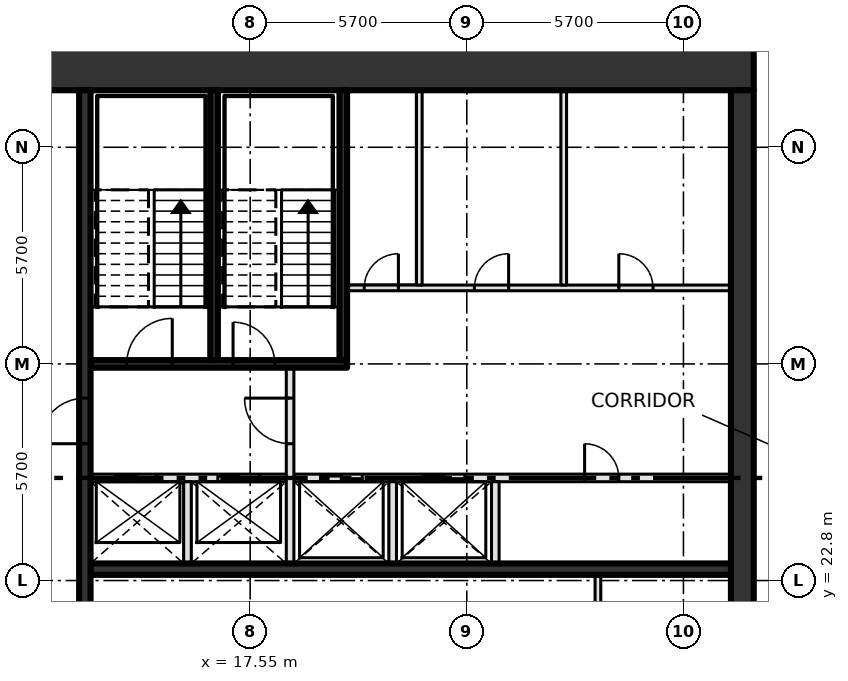
"""IFC4 building model, lengths in metres.
Left out: names, types, materials, properties, quantities, classifications, styles, units other than length and angle.
Written with IfcOpenShell. Run it as: python <this file> out.ifc"""

import sys

from ifc_helpers import new_model, si_unit, direction, frame, frame_2d, origin, place, context, subcontext, project, spatial, rectangle, extrude, element, fill, save


model = new_model("IFC4")
c1 = context("Model", 3, precision=1e-05, world=origin(), true_north=direction((0.0, 1.0)))
c2 = subcontext(c1, "Body", "Model", "MODEL_VIEW")
j1 = project(units=[si_unit("LENGTHUNIT", "METRE"), si_unit("PLANEANGLEUNIT", "RADIAN")], contexts=[c1])
p1 = place(None, origin())
s1 = spatial("IfcSite", under=j1, at=p1, CompositionType="ELEMENT")
p2 = place(p1, origin())
s2 = spatial("IfcBuilding", under=s1, at=p2, CompositionType="ELEMENT")
p3 = place(p2, frame((0.0, 0.0, 327.6)))
s3 = spatial("IfcBuildingStorey", under=s2, at=p3, CompositionType="ELEMENT", Elevation=327.6)
p4 = place(p3, frame((8.0, 36.3, -0.3), z_axis=(0.0, 0.0, 1.0), x_axis=(1.0, 0.0, 0.0)))
e1 = element("IfcWall", 1, at=p4, inside=s3, PredefinedType="SHEAR", context=c2, shape_type="SweptSolid", body=[
    extrude(rectangle(XDim=22.8, YDim=1.2, at=frame_2d((11.4, 0.0))), origin(), (0.0, 0.0, 1.0), 4.2),
])
p5 = place(p4, frame((2.3, 0.0, 0.3)))
e2 = element("IfcOpeningElement", 2, at=p5, cuts=e1, PredefinedType="OPENING", context=c2, shape_type="SweptSolid", body=[
    extrude(rectangle(XDim=1.8, YDim=2.1, at=frame_2d((0.9, 1.05))), frame((0.0, 0.61, 0.0), z_axis=(0.0, -1.0, 0.0), x_axis=(1.0, 0.0, 0.0)), (0.0, 0.0, 1.0), 1.22),
])
p6 = place(p3, frame((30.5, 14.7, -0.3), z_axis=(0.0, 0.0, 1.0), x_axis=(0.0, 1.0, 0.0)))
e3 = element("IfcWall", 3, at=p6, inside=s3, PredefinedType="SHEAR", context=c2, shape_type="SweptSolid", body=[
    extrude(rectangle(XDim=21.0, YDim=0.6, at=frame_2d((10.5, 0.0))), origin(), (0.0, 0.0, 1.0), 4.2),
])
p7 = place(p3, frame((13.35, 23.1, 0.0), z_axis=(0.0, 0.0, 1.0), x_axis=(1.0, 0.0, 0.0)))
e4 = element("IfcWall", 4, at=p7, inside=s3, PredefinedType="SHEAR", context=c2, shape_type="SweptSolid", body=[
    extrude(rectangle(XDim=16.85, YDim=0.3, at=frame_2d((8.425, 0.0))), origin(), (0.0, 0.0, 1.0), 3.9),
])
p8 = place(p3, frame((13.35, 25.5, 0.0), z_axis=(0.0, 0.0, 1.0), x_axis=(1.0, 0.0, 0.0)))
e5 = element("IfcWall", 5, at=p8, inside=s3, PredefinedType="SOLIDWALL", context=c2, shape_type="SweptSolid", body=[
    extrude(rectangle(XDim=16.85, YDim=0.2, at=frame_2d((8.425, 0.0))), origin(), (0.0, 0.0, 1.0), 3.9),
])
p9 = place(p8, frame((0.65, 0.0, 0.0)))
e6 = element("IfcOpeningElement", 6, at=p9, cuts=e5, PredefinedType="OPENING", context=c2, shape_type="SweptSolid", body=[
    extrude(rectangle(XDim=1.1, YDim=2.1, at=frame_2d((0.55, 1.05))), frame((0.0, 0.11, 0.0), z_axis=(0.0, -1.0, 0.0), x_axis=(1.0, 0.0, 0.0)), (0.0, 0.0, 1.0), 0.22),
])
p10 = place(p8, frame((3.35, 0.0, 0.0)))
e7 = element("IfcOpeningElement", 7, at=p10, cuts=e5, PredefinedType="OPENING", context=c2, shape_type="SweptSolid", body=[
    extrude(rectangle(XDim=1.1, YDim=2.1, at=frame_2d((0.55, 1.05))), frame((0.0, 0.11, 0.0), z_axis=(0.0, -1.0, 0.0), x_axis=(1.0, 0.0, 0.0)), (0.0, 0.0, 1.0), 0.22),
])
p11 = place(p8, frame((6.05, 0.0, 0.0)))
e8 = element("IfcOpeningElement", 8, at=p11, cuts=e5, PredefinedType="OPENING", context=c2, shape_type="SweptSolid", body=[
    extrude(rectangle(XDim=1.1, YDim=2.1, at=frame_2d((0.55, 1.05))), frame((0.0, 0.11, 0.0), z_axis=(0.0, -1.0, 0.0), x_axis=(1.0, 0.0, 0.0)), (0.0, 0.0, 1.0), 0.22),
])
p12 = place(p8, frame((8.75, 0.0, 0.0)))
e9 = element("IfcOpeningElement", 9, at=p12, cuts=e5, PredefinedType="OPENING", context=c2, shape_type="SweptSolid", body=[
    extrude(rectangle(XDim=1.1, YDim=2.1, at=frame_2d((0.55, 1.05))), frame((0.0, 0.11, 0.0), z_axis=(0.0, -1.0, 0.0), x_axis=(1.0, 0.0, 0.0)), (0.0, 0.0, 1.0), 0.22),
])
p13 = place(p8, frame((13.0, 0.0, 0.0)))
e10 = element("IfcOpeningElement", 10, at=p13, cuts=e5, PredefinedType="OPENING", context=c2, shape_type="SweptSolid", body=[
    extrude(rectangle(XDim=0.9, YDim=2.1, at=frame_2d((0.45, 1.05))), frame((0.0, 0.11, 0.0), z_axis=(0.0, -1.0, 0.0), x_axis=(1.0, 0.0, 0.0)), (0.0, 0.0, 1.0), 0.22),
])
p14 = place(p3, frame((13.35, 28.5, 0.0), z_axis=(0.0, 0.0, 1.0), x_axis=(1.0, 0.0, 0.0)))
e11 = element("IfcWall", 11, at=p14, inside=s3, PredefinedType="SOLIDWALL", context=c2, shape_type="SweptSolid", body=[
    extrude(rectangle(XDim=6.75, YDim=0.2, at=frame_2d((3.375, 0.0))), origin(), (0.0, 0.0, 1.0), 3.9),
])
p15 = place(p14, frame((0.95, 0.0, 0.0)))
e12 = element("IfcOpeningElement", 12, at=p15, cuts=e11, PredefinedType="OPENING", context=c2, shape_type="SweptSolid", body=[
    extrude(rectangle(XDim=1.2, YDim=2.1, at=frame_2d((0.6, 1.05))), frame((0.0, 0.11, 0.0), z_axis=(0.0, -1.0, 0.0), x_axis=(1.0, 0.0, 0.0)), (0.0, 0.0, 1.0), 0.22),
])
p16 = place(p14, frame((3.75, 0.0, 0.0)))
e13 = element("IfcOpeningElement", 13, at=p16, cuts=e11, PredefinedType="OPENING", context=c2, shape_type="SweptSolid", body=[
    extrude(rectangle(XDim=1.1, YDim=2.1, at=frame_2d((0.55, 1.05))), frame((0.0, 0.11, 0.0), z_axis=(0.0, -1.0, 0.0), x_axis=(1.0, 0.0, 0.0)), (0.0, 0.0, 1.0), 0.22),
])
p17 = place(p3, frame((20.1, 30.5, 0.0), z_axis=(0.0, 0.0, 1.0), x_axis=(1.0, 0.0, 0.0)))
e14 = element("IfcWall", 14, at=p17, inside=s3, PredefinedType="PARTITIONING", context=c2, shape_type="SweptSolid", body=[
    extrude(rectangle(XDim=10.1, YDim=0.15, at=frame_2d((5.05, 0.0))), origin(), (0.0, 0.0, 1.0), 3.9),
])
p18 = place(p17, frame((0.45, 0.0, 0.0)))
e15 = element("IfcOpeningElement", 15, at=p18, cuts=e14, PredefinedType="OPENING", context=c2, shape_type="SweptSolid", body=[
    extrude(rectangle(XDim=0.9, YDim=2.1, at=frame_2d((0.45, 1.05))), frame((0.0, 0.085, 0.0), z_axis=(0.0, -1.0, 0.0), x_axis=(1.0, 0.0, 0.0)), (0.0, 0.0, 1.0), 0.17),
])
p19 = place(p17, frame((3.35, 0.0, 0.0)))
e16 = element("IfcOpeningElement", 16, at=p19, cuts=e14, PredefinedType="OPENING", context=c2, shape_type="SweptSolid", body=[
    extrude(rectangle(XDim=0.9, YDim=2.1, at=frame_2d((0.45, 1.05))), frame((0.0, 0.085, 0.0), z_axis=(0.0, -1.0, 0.0), x_axis=(1.0, 0.0, 0.0)), (0.0, 0.0, 1.0), 0.17),
])
p20 = place(p17, frame((7.15, 0.0, 0.0)))
e17 = element("IfcOpeningElement", 17, at=p20, cuts=e14, PredefinedType="OPENING", context=c2, shape_type="SweptSolid", body=[
    extrude(rectangle(XDim=0.9, YDim=2.1, at=frame_2d((0.45, 1.05))), frame((0.0, 0.085, 0.0), z_axis=(0.0, -1.0, 0.0), x_axis=(1.0, 0.0, 0.0)), (0.0, 0.0, 1.0), 0.17),
])
p21 = place(p3, frame((13.2, 14.7, 0.0), z_axis=(0.0, 0.0, 1.0), x_axis=(0.0, 1.0, 0.0)))
e18 = element("IfcWall", 18, at=p21, inside=s3, PredefinedType="SHEAR", context=c2, shape_type="SweptSolid", body=[
    extrude(rectangle(XDim=21.0, YDim=0.3, at=frame_2d((10.5, 0.0))), origin(), (0.0, 0.0, 1.0), 3.9),
])
p22 = place(p21, frame((3.6, 0.0, 0.0)))
e19 = element("IfcOpeningElement", 19, at=p22, cuts=e18, PredefinedType="OPENING", context=c2, shape_type="SweptSolid", body=[
    extrude(rectangle(XDim=1.8, YDim=2.1, at=frame_2d((0.9, 1.05))), frame((0.0, 0.16, 0.0), z_axis=(0.0, -1.0, 0.0), x_axis=(1.0, 0.0, 0.0)), (0.0, 0.0, 1.0), 0.32),
])
p23 = place(p21, frame((11.7, 0.0, 0.0)))
e20 = element("IfcOpeningElement", 20, at=p23, cuts=e18, PredefinedType="OPENING", context=c2, shape_type="SweptSolid", body=[
    extrude(rectangle(XDim=1.2, YDim=2.1, at=frame_2d((0.6, 1.05))), frame((0.0, 0.16, 0.0), z_axis=(0.0, -1.0, 0.0), x_axis=(1.0, 0.0, 0.0)), (0.0, 0.0, 1.0), 0.32),
])
p24 = place(p3, frame((15.9, 23.25, 0.0), z_axis=(0.0, 0.0, 1.0), x_axis=(0.0, 1.0, 0.0)))
e21 = element("IfcWall", 21, at=p24, inside=s3, PredefinedType="SOLIDWALL", context=c2, shape_type="SweptSolid", body=[
    extrude(rectangle(XDim=2.15, YDim=0.2, at=frame_2d((1.075, 0.0))), origin(), (0.0, 0.0, 1.0), 3.9),
])
p25 = place(p3, frame((16.6, 28.6, 0.0), z_axis=(0.0, 0.0, 1.0), x_axis=(0.0, 1.0, 0.0)))
e22 = element("IfcWall", 22, at=p25, inside=s3, PredefinedType="SOLIDWALL", context=c2, shape_type="SweptSolid", body=[
    extrude(rectangle(XDim=7.1, YDim=0.2, at=frame_2d((3.55, 0.0))), origin(), (0.0, 0.0, 1.0), 3.9),
])
p26 = place(p3, frame((18.6, 23.25, 0.0), z_axis=(0.0, 0.0, 1.0), x_axis=(0.0, 1.0, 0.0)))
e23 = element("IfcWall", 23, at=p26, inside=s3, PredefinedType="SOLIDWALL", context=c2, shape_type="SweptSolid", body=[
    extrude(rectangle(XDim=5.15, YDim=0.2, at=frame_2d((2.575, 0.0))), origin(), (0.0, 0.0, 1.0), 3.9),
])
p27 = place(p26, frame((3.15, 0.0, 0.0)))
e24 = element("IfcOpeningElement", 24, at=p27, cuts=e23, PredefinedType="OPENING", context=c2, shape_type="SweptSolid", body=[
    extrude(rectangle(XDim=1.2, YDim=2.1, at=frame_2d((0.6, 1.05))), frame((0.0, 0.11, 0.0), z_axis=(0.0, -1.0, 0.0), x_axis=(1.0, 0.0, 0.0)), (0.0, 0.0, 1.0), 0.22),
])
p28 = place(p3, frame((20.0, 28.6, 0.0), z_axis=(0.0, 0.0, 1.0), x_axis=(0.0, 1.0, 0.0)))
e25 = element("IfcWall", 25, at=p28, inside=s3, PredefinedType="SOLIDWALL", context=c2, shape_type="SweptSolid", body=[
    extrude(rectangle(XDim=7.1, YDim=0.2, at=frame_2d((3.55, 0.0))), origin(), (0.0, 0.0, 1.0), 3.9),
])
p29 = place(p3, frame((21.3, 23.25, 0.0), z_axis=(0.0, 0.0, 1.0), x_axis=(0.0, 1.0, 0.0)))
e26 = element("IfcWall", 26, at=p29, inside=s3, PredefinedType="SOLIDWALL", context=c2, shape_type="SweptSolid", body=[
    extrude(rectangle(XDim=2.15, YDim=0.2, at=frame_2d((1.075, 0.0))), origin(), (0.0, 0.0, 1.0), 3.9),
])
p30 = place(p3, frame((22.0, 30.575, 0.0), z_axis=(0.0, 0.0, 1.0), x_axis=(0.0, 1.0, 0.0)))
e27 = element("IfcWall", 27, at=p30, inside=s3, PredefinedType="PARTITIONING", context=c2, shape_type="SweptSolid", body=[
    extrude(rectangle(XDim=5.125, YDim=0.15, at=frame_2d((2.562, 0.0))), origin(), (0.0, 0.0, 1.0), 3.9),
])
p31 = place(p3, frame((24.0, 23.25, 0.0), z_axis=(0.0, 0.0, 1.0), x_axis=(0.0, 1.0, 0.0)))
e28 = element("IfcWall", 28, at=p31, inside=s3, PredefinedType="SOLIDWALL", context=c2, shape_type="SweptSolid", body=[
    extrude(rectangle(XDim=2.15, YDim=0.2, at=frame_2d((1.075, 0.0))), origin(), (0.0, 0.0, 1.0), 3.9),
])
p32 = place(p3, frame((25.8, 30.575, 0.0), z_axis=(0.0, 0.0, 1.0), x_axis=(0.0, 1.0, 0.0)))
e29 = element("IfcWall", 29, at=p32, inside=s3, PredefinedType="PARTITIONING", context=c2, shape_type="SweptSolid", body=[
    extrude(rectangle(XDim=5.125, YDim=0.15, at=frame_2d((2.562, 0.0))), origin(), (0.0, 0.0, 1.0), 3.9),
])
p33 = place(p3, frame((26.7, 20.775, 0.0), z_axis=(0.0, 0.0, 1.0), x_axis=(0.0, 1.0, 0.0)))
e30 = element("IfcWall", 30, at=p33, inside=s3, PredefinedType="PARTITIONING", context=c2, shape_type="SweptSolid", body=[
    extrude(rectangle(XDim=2.175, YDim=0.15, at=frame_2d((1.087, 0.0))), origin(), (0.0, 0.0, 1.0), 3.9),
])
p34 = place(p9, origin())
e31 = element("IfcDoor", 31, at=p34, inside=s3, OperationType="SLIDING_TO_LEFT", PredefinedType="DOOR", context=c2, shape_type="SweptSolid", body=[
    extrude(rectangle(XDim=1.1, YDim=2.1, at=frame_2d((0.55, 1.05))), frame((0.0, 0.025, 0.0), z_axis=(0.0, -1.0, 0.0), x_axis=(1.0, 0.0, 0.0)), (0.0, 0.0, 1.0), 0.05),
])
fill(e6, e31)
p35 = place(p10, origin())
e32 = element("IfcDoor", 32, at=p35, inside=s3, OperationType="SLIDING_TO_LEFT", PredefinedType="DOOR", context=c2, shape_type="SweptSolid", body=[
    extrude(rectangle(XDim=1.1, YDim=2.1, at=frame_2d((0.55, 1.05))), frame((0.0, 0.025, 0.0), z_axis=(0.0, -1.0, 0.0), x_axis=(1.0, 0.0, 0.0)), (0.0, 0.0, 1.0), 0.05),
])
fill(e7, e32)
p36 = place(p11, origin())
e33 = element("IfcDoor", 33, at=p36, inside=s3, OperationType="SLIDING_TO_LEFT", PredefinedType="DOOR", context=c2, shape_type="SweptSolid", body=[
    extrude(rectangle(XDim=1.1, YDim=2.1, at=frame_2d((0.55, 1.05))), frame((0.0, 0.025, 0.0), z_axis=(0.0, -1.0, 0.0), x_axis=(1.0, 0.0, 0.0)), (0.0, 0.0, 1.0), 0.05),
])
fill(e8, e33)
p37 = place(p12, origin())
e34 = element("IfcDoor", 34, at=p37, inside=s3, OperationType="SLIDING_TO_LEFT", PredefinedType="DOOR", context=c2, shape_type="SweptSolid", body=[
    extrude(rectangle(XDim=1.1, YDim=2.1, at=frame_2d((0.55, 1.05))), frame((0.0, 0.025, 0.0), z_axis=(0.0, -1.0, 0.0), x_axis=(1.0, 0.0, 0.0)), (0.0, 0.0, 1.0), 0.05),
])
fill(e9, e34)
p38 = place(p13, origin())
e35 = element("IfcDoor", 35, at=p38, inside=s3, OperationType="SINGLE_SWING_LEFT", PredefinedType="DOOR", context=c2, shape_type="SweptSolid", body=[
    extrude(rectangle(XDim=0.9, YDim=2.1, at=frame_2d((0.45, 1.05))), frame((0.0, 0.025, 0.0), z_axis=(0.0, -1.0, 0.0), x_axis=(1.0, 0.0, 0.0)), (0.0, 0.0, 1.0), 0.05),
])
fill(e10, e35)
p39 = place(p18, origin())
e36 = element("IfcDoor", 36, at=p39, inside=s3, OperationType="SINGLE_SWING_RIGHT", PredefinedType="DOOR", context=c2, shape_type="SweptSolid", body=[
    extrude(rectangle(XDim=0.9, YDim=2.1, at=frame_2d((0.45, 1.05))), frame((0.0, 0.025, 0.0), z_axis=(0.0, -1.0, 0.0), x_axis=(1.0, 0.0, 0.0)), (0.0, 0.0, 1.0), 0.05),
])
fill(e15, e36)
p40 = place(p19, origin())
e37 = element("IfcDoor", 37, at=p40, inside=s3, OperationType="SINGLE_SWING_RIGHT", PredefinedType="DOOR", context=c2, shape_type="SweptSolid", body=[
    extrude(rectangle(XDim=0.9, YDim=2.1, at=frame_2d((0.45, 1.05))), frame((0.0, 0.025, 0.0), z_axis=(0.0, -1.0, 0.0), x_axis=(1.0, 0.0, 0.0)), (0.0, 0.0, 1.0), 0.05),
])
fill(e16, e37)
p41 = place(p20, origin())
e38 = element("IfcDoor", 38, at=p41, inside=s3, OperationType="SINGLE_SWING_LEFT", PredefinedType="DOOR", context=c2, shape_type="SweptSolid", body=[
    extrude(rectangle(XDim=0.9, YDim=2.1, at=frame_2d((0.45, 1.05))), frame((0.0, 0.025, 0.0), z_axis=(0.0, -1.0, 0.0), x_axis=(1.0, 0.0, 0.0)), (0.0, 0.0, 1.0), 0.05),
])
fill(e17, e38)
p42 = place(p15, origin())
e39 = element("IfcDoor", 39, at=p42, inside=s3, OperationType="SINGLE_SWING_RIGHT", PredefinedType="DOOR", context=c2, shape_type="SweptSolid", body=[
    extrude(rectangle(XDim=1.2, YDim=2.1, at=frame_2d((0.6, 1.05))), frame((0.0, 0.025, 0.0), z_axis=(0.0, -1.0, 0.0), x_axis=(1.0, 0.0, 0.0)), (0.0, 0.0, 1.0), 0.05),
])
fill(e12, e39)
p43 = place(p16, origin())
e40 = element("IfcDoor", 40, at=p43, inside=s3, OperationType="SINGLE_SWING_LEFT", PredefinedType="DOOR", context=c2, shape_type="SweptSolid", body=[
    extrude(rectangle(XDim=1.1, YDim=2.1, at=frame_2d((0.55, 1.05))), frame((0.0, 0.025, 0.0), z_axis=(0.0, -1.0, 0.0), x_axis=(1.0, 0.0, 0.0)), (0.0, 0.0, 1.0), 0.05),
])
fill(e13, e40)
p44 = place(p23, origin())
e41 = element("IfcDoor", 41, at=p44, inside=s3, OperationType="SINGLE_SWING_LEFT", PredefinedType="DOOR", context=c2, shape_type="SweptSolid", body=[
    extrude(rectangle(XDim=1.2, YDim=2.1, at=frame_2d((0.6, 1.05))), frame((0.0, 0.025, 0.0), z_axis=(0.0, -1.0, 0.0), x_axis=(1.0, 0.0, 0.0)), (0.0, 0.0, 1.0), 0.05),
])
fill(e20, e41)
p45 = place(p27, origin())
e42 = element("IfcDoor", 42, at=p45, inside=s3, OperationType="SINGLE_SWING_RIGHT", PredefinedType="DOOR", context=c2, shape_type="SweptSolid", body=[
    extrude(rectangle(XDim=1.2, YDim=2.1, at=frame_2d((0.6, 1.05))), frame((0.0, 0.025, 0.0), z_axis=(0.0, -1.0, 0.0), x_axis=(1.0, 0.0, 0.0)), (0.0, 0.0, 1.0), 0.05),
])
fill(e24, e42)
save(model, sys.argv[1])
